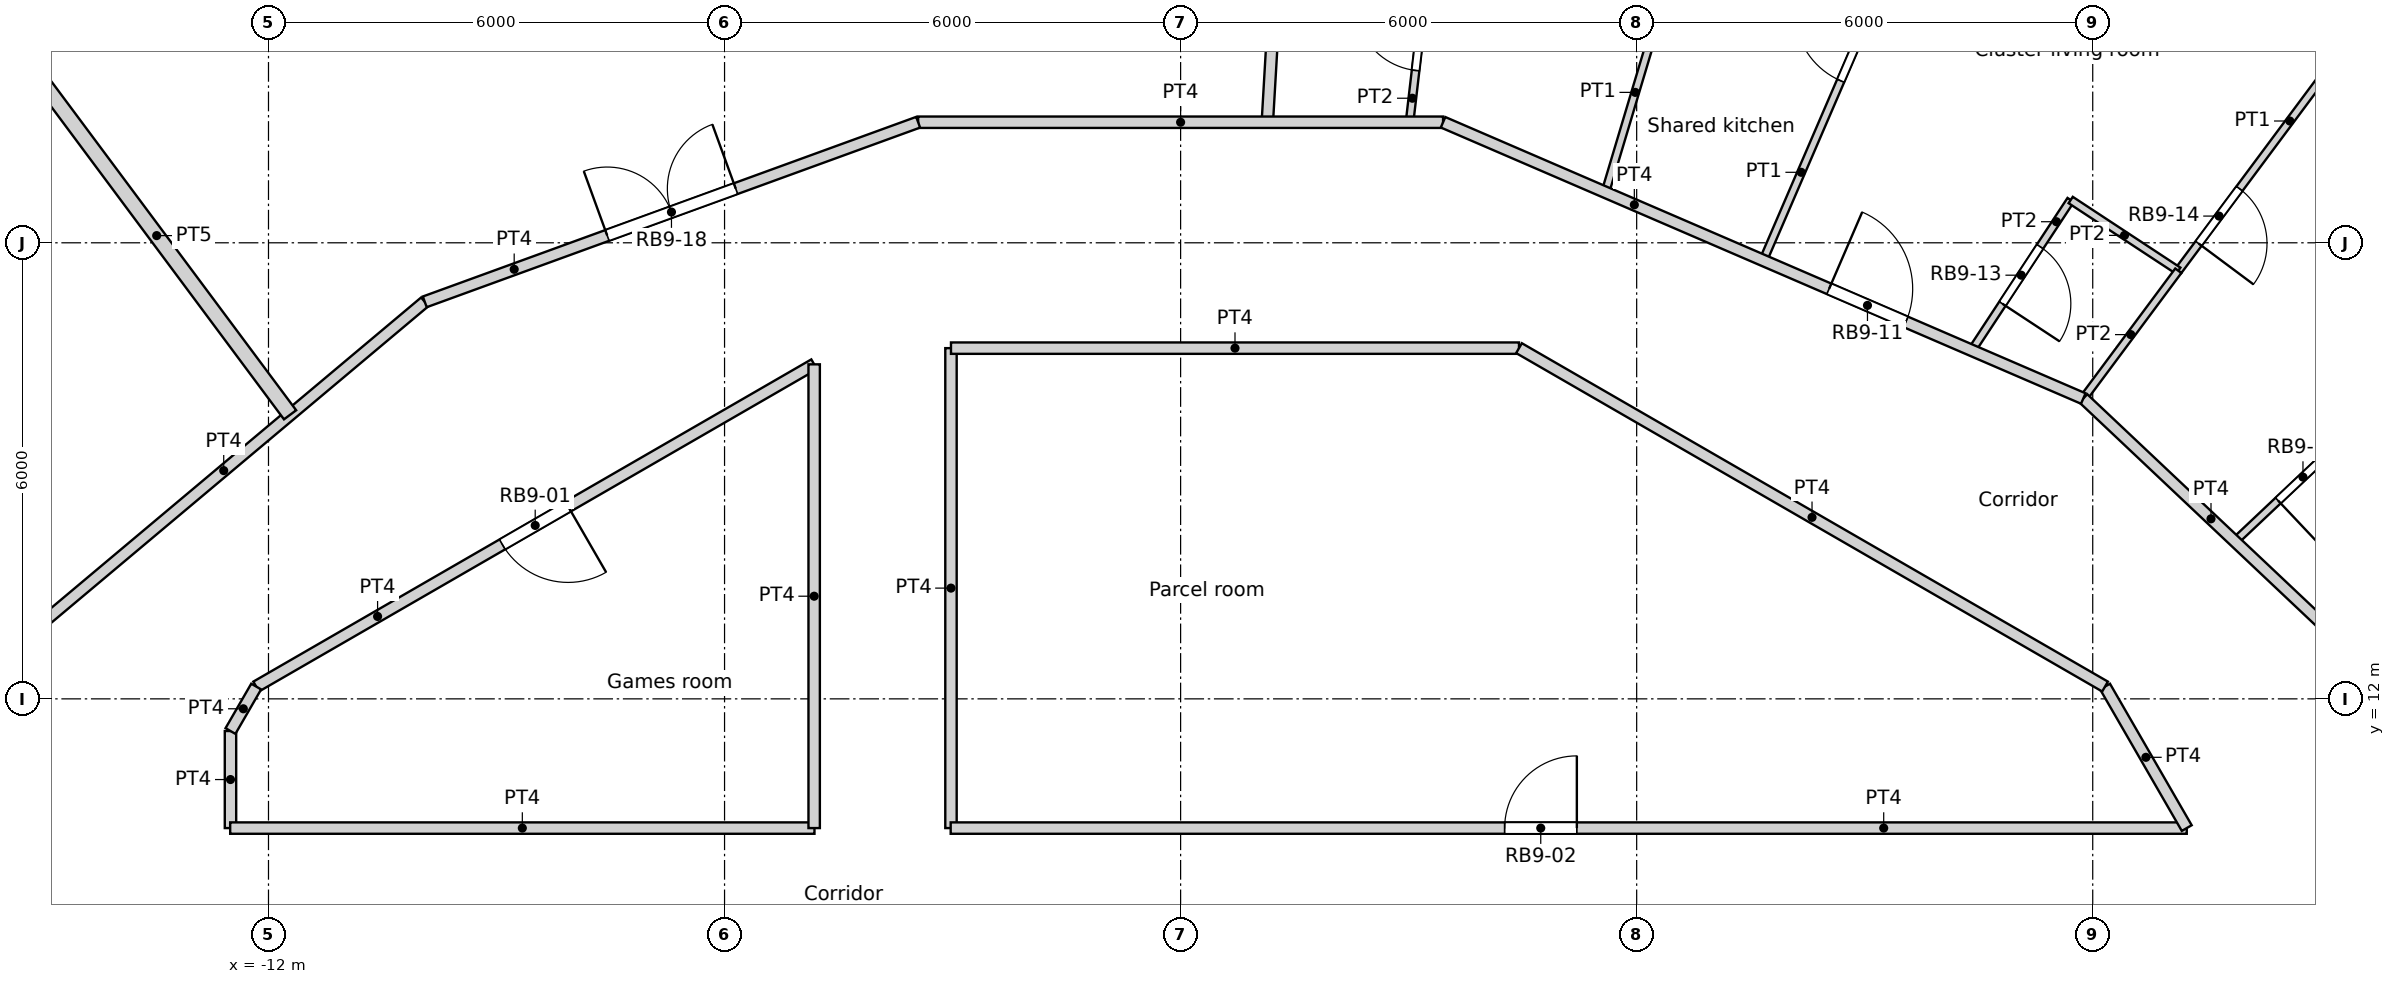
"""IFC4 building model, lengths in metres.
Left out: names, types, materials, properties, quantities, classifications, styles, units other than length and angle.
Written with IfcOpenShell. Run it as: python <this file> out.ifc"""

import sys

from ifc_helpers import new_model, si_unit, direction, frame, frame_2d, origin, origin_2d, place, context, subcontext, project, spatial, rectangle, circle, extrude, element, fill, save


model = new_model("IFC4")
c1 = context("Model", 3, precision=1e-05, world=origin(), true_north=direction((0.0, 1.0)))
c2 = subcontext(c1, "Body", "Model", "MODEL_VIEW")
j1 = project(units=[si_unit("LENGTHUNIT", "METRE"), si_unit("PLANEANGLEUNIT", "RADIAN")], contexts=[c1])
p1 = place(None, origin())
s1 = spatial("IfcSite", under=j1, at=p1, CompositionType="ELEMENT")
p2 = place(p1, origin())
s2 = spatial("IfcBuilding", under=s1, at=p2, CompositionType="ELEMENT")
p3 = place(p2, frame((0.0, 0.0, 212.4)))
s3 = spatial("IfcBuildingStorey", under=s2, at=p3, CompositionType="ELEMENT", Elevation=212.4)
p4 = place(p3, frame((14.659, 19.69, 0.0), z_axis=(0.0, 0.0, 1.0), x_axis=(1.0, 0.0, 0.0)))
e1 = element("IfcColumn", 1, at=p4, inside=s3, PredefinedType="COLUMN", context=c2, shape_type="SweptSolid", body=[
    extrude(circle(Radius=0.6, at=origin_2d()), origin(), (0.0, 0.0, 1.0), 3.6),
])
for number, where, z_axis, x_axis in (
    (2, (15.552, 10.603, 0.0), (0.0, 0.0, 1.0), (1.0, 0.0, 0.0)),
    (3, (11.735, 14.716, 0.0), (0.0, 0.0, 1.0), (1.0, 0.0, 0.0)),
    (4, (6.876, 17.521, 0.0), (0.0, 0.0, 1.0), (1.0, 0.0, 0.0)),
    (5, (1.406, 18.77, 0.0), (0.0, 0.0, 1.0), (1.0, 0.0, 0.0)),
    (6, (-4.188, 18.35, 0.0), (0.0, 0.0, 1.0), (1.0, 0.0, 0.0)),
    (7, (-9.411, 16.301, 0.0), (0.0, 0.0, 1.0), (1.0, 0.0, 0.0)),
    (8, (-13.798, 12.802, 0.0), (0.0, 0.0, 1.0), (1.0, 0.0, 0.0)),
):
    element("IfcColumn", number, at=place(p3, frame(where, z_axis=z_axis, x_axis=x_axis)), inside=s3, PredefinedType="COLUMN", context=c2, shape_type="SweptSolid", body=[
        extrude(circle(Radius=0.65, at=origin_2d()), origin(), (0.0, 0.0, 1.0), 3.6),
    ])
p5 = place(p3, frame((15.308, 20.578, 0.0), z_axis=(0.0, 0.0, 1.0), x_axis=(-0.835470659512, 0.549535055382, 0.0)))
e9 = element("IfcWall", 9, at=p5, inside=s3, PredefinedType="SOLIDWALL", context=c2, shape_type="SweptSolid", body=[
    extrude(rectangle(XDim=2.973, YDim=0.3, at=frame_2d((1.487, 0.0))), origin(), (0.0, 0.0, 1.0), 3.3),
])
p6 = place(p5, frame((1.486, 0.0, 1.55)))
e10 = element("IfcOpeningElement", 10, at=p6, cuts=e9, PredefinedType="OPENING", context=c2, shape_type="SweptSolid", body=[
    extrude(circle(Radius=0.9, at=origin_2d()), frame((0.0, 0.16, 0.0), z_axis=(0.0, -1.0, 0.0), x_axis=(1.0, 0.0, 0.0)), (0.0, 0.0, 1.0), 0.32),
])
p7 = place(p3, frame((-12.824, 22.211, 0.0), z_axis=(0.0, 0.0, 1.0), x_axis=(-0.835470659512, -0.549535055382, 0.0)))
e11 = element("IfcWall", 11, at=p7, inside=s3, PredefinedType="SOLIDWALL", context=c2, shape_type="SweptSolid", body=[
    extrude(rectangle(XDim=2.973, YDim=0.3, at=frame_2d((1.487, 0.0))), origin(), (0.0, 0.0, 1.0), 3.3),
])
p8 = place(p7, frame((1.486, 0.0, 1.55)))
e12 = element("IfcOpeningElement", 12, at=p8, cuts=e11, PredefinedType="OPENING", context=c2, shape_type="SweptSolid", body=[
    extrude(circle(Radius=0.9, at=origin_2d()), frame((0.0, 0.16, 0.0), z_axis=(0.0, -1.0, 0.0), x_axis=(1.0, 0.0, 0.0)), (0.0, 0.0, 1.0), 0.32),
])
p9 = place(p3, frame((-12.504, 10.3, 0.0), z_axis=(0.0, 0.0, 1.0), x_axis=(1.0, 0.0, 0.0)))
e13 = element("IfcWall", 13, at=p9, inside=s3, PredefinedType="PARTITIONING", context=c2, shape_type="SweptSolid", body=[
    extrude(rectangle(XDim=7.687, YDim=0.15, at=frame_2d((3.844, 0.0))), origin(), (0.0, 0.0, 1.0), 3.15),
])
p10 = place(p3, frame((-3.025, 10.3, 0.0), z_axis=(0.0, 0.0, 1.0), x_axis=(1.0, 0.0, 0.0)))
e14 = element("IfcWall", 14, at=p10, inside=s3, PredefinedType="PARTITIONING", context=c2, shape_type="SweptSolid", body=[
    extrude(rectangle(XDim=16.262, YDim=0.15, at=frame_2d((8.131, 0.0))), origin(), (0.0, 0.0, 1.0), 3.15),
])
p11 = place(p10, frame((7.288, 0.0, 0.0)))
e15 = element("IfcOpeningElement", 15, at=p11, cuts=e14, PredefinedType="OPENING", context=c2, shape_type="SweptSolid", body=[
    extrude(rectangle(XDim=0.95, YDim=2.1, at=frame_2d((0.475, 1.05))), frame((0.0, 0.075, 0.0), z_axis=(0.0, -1.0, 0.0), x_axis=(1.0, 0.0, 0.0)), (0.0, 0.0, 1.0), 0.15),
])
p12 = place(p3, frame((12.162, 12.162, 0.0), z_axis=(0.0, 0.0, 1.0), x_axis=(0.499961633463, -0.866047553582, 0.0)))
e16 = element("IfcWall", 16, at=p12, inside=s3, PredefinedType="PARTITIONING", context=c2, shape_type="SweptSolid", body=[
    extrude(rectangle(XDim=2.15, YDim=0.15, at=frame_2d((1.075, 0.0))), origin(), (0.0, 0.0, 1.0), 3.15),
])
p13 = place(p3, frame((11.877, 15.953, 0.0), z_axis=(0.0, 0.0, 1.0), x_axis=(0.727299029876, -0.686320713035, 0.0)))
e17 = element("IfcWall", 17, at=p13, inside=s3, PredefinedType="PARTITIONING", context=c2, shape_type="SweptSolid", body=[
    extrude(rectangle(XDim=4.617, YDim=0.15, at=frame_2d((2.309, 0.0))), origin(), (0.0, 0.0, 1.0), 3.15),
])
p14 = place(p3, frame((-4.821, 10.3, 0.0), z_axis=(0.0, 0.0, 1.0), x_axis=(0.0, 1.0, 0.0)))
e18 = element("IfcWall", 18, at=p14, inside=s3, PredefinedType="PARTITIONING", context=c2, shape_type="SweptSolid", body=[
    extrude(rectangle(XDim=6.101, YDim=0.15, at=frame_2d((3.05, 0.0))), origin(), (0.0, 0.0, 1.0), 3.15),
])
p15 = place(p3, frame((-12.162, 12.162, 0.0), z_axis=(0.0, 0.0, 1.0), x_axis=(0.866004766557, 0.500035743023, 0.0)))
e19 = element("IfcWall", 19, at=p15, inside=s3, PredefinedType="PARTITIONING", context=c2, shape_type="SweptSolid", body=[
    extrude(rectangle(XDim=8.477, YDim=0.15, at=frame_2d((4.239, 0.0))), origin(), (0.0, 0.0, 1.0), 3.15),
])
p16 = place(p15, frame((3.739, 0.0, 0.0)))
e20 = element("IfcOpeningElement", 20, at=p16, cuts=e19, PredefinedType="OPENING", context=c2, shape_type="SweptSolid", body=[
    extrude(rectangle(XDim=1.0, YDim=2.04, at=frame_2d((0.5, 1.02))), frame((0.0, 0.075, 0.0), z_axis=(0.0, -1.0, 0.0), x_axis=(1.0, 0.0, 0.0)), (0.0, 0.0, 1.0), 0.15),
])
p17 = place(p3, frame((4.452, 16.614, 0.0), z_axis=(0.0, 0.0, 1.0), x_axis=(0.866005203721, -0.500034985904, 0.0)))
e21 = element("IfcWall", 21, at=p17, inside=s3, PredefinedType="PARTITIONING", context=c2, shape_type="SweptSolid", body=[
    extrude(rectangle(XDim=8.903, YDim=0.15, at=frame_2d((4.452, 0.0))), origin(), (0.0, 0.0, 1.0), 3.15),
])
p18 = place(p3, frame((-3.021, 16.614, 0.0), z_axis=(0.0, 0.0, 1.0), x_axis=(1.0, 0.0, 0.0)))
e22 = element("IfcWall", 22, at=p18, inside=s3, PredefinedType="PARTITIONING", context=c2, shape_type="SweptSolid", body=[
    extrude(rectangle(XDim=7.473, YDim=0.15, at=frame_2d((3.736, 0.0))), origin(), (0.0, 0.0, 1.0), 3.15),
])
p19 = place(p3, frame((-3.021, 10.3, 0.0), z_axis=(0.0, 0.0, 1.0), x_axis=(0.0, 1.0, 0.0)))
e23 = element("IfcWall", 23, at=p19, inside=s3, PredefinedType="PARTITIONING", context=c2, shape_type="SweptSolid", body=[
    extrude(rectangle(XDim=6.314, YDim=0.15, at=frame_2d((3.157, 0.0))), origin(), (0.0, 0.0, 1.0), 3.15),
])
p20 = place(p3, frame((3.453, 19.586, 0.0), z_axis=(0.0, 0.0, 1.0), x_axis=(0.918175908205, -0.396172944044, 0.0)))
e24 = element("IfcWall", 24, at=p20, inside=s3, PredefinedType="PARTITIONING", context=c2, shape_type="SweptSolid", body=[
    extrude(rectangle(XDim=9.173, YDim=0.15, at=frame_2d((4.587, 0.0))), origin(), (0.0, 0.0, 1.0), 3.15),
])
p21 = place(p20, frame((5.531, 0.0, 0.0)))
e25 = element("IfcOpeningElement", 25, at=p21, cuts=e24, PredefinedType="OPENING", context=c2, shape_type="SweptSolid", body=[
    extrude(rectangle(XDim=1.1, YDim=2.1, at=frame_2d((0.55, 1.05))), frame((0.0, 0.075, 0.0), z_axis=(0.0, -1.0, 0.0), x_axis=(1.0, 0.0, 0.0)), (0.0, 0.0, 1.0), 0.15),
])
p22 = place(p3, frame((-3.453, 19.586, 0.0), z_axis=(0.0, 0.0, 1.0), x_axis=(1.0, 0.0, 0.0)))
e26 = element("IfcWall", 26, at=p22, inside=s3, PredefinedType="PARTITIONING", context=c2, shape_type="SweptSolid", body=[
    extrude(rectangle(XDim=6.906, YDim=0.15, at=frame_2d((3.453, 0.0))), origin(), (0.0, 0.0, 1.0), 3.15),
])
p23 = place(p3, frame((-15.234, 12.783, 0.0), z_axis=(0.0, 0.0, 1.0), x_axis=(0.765936018543, 0.642916802937, 0.0)))
e27 = element("IfcWall", 27, at=p23, inside=s3, PredefinedType="PARTITIONING", context=c2, shape_type="SweptSolid", body=[
    extrude(rectangle(XDim=6.906, YDim=0.15, at=frame_2d((3.453, 0.0))), origin(), (0.0, 0.0, 1.0), 3.15),
])
p24 = place(p3, frame((-9.944, 17.223, 0.0), z_axis=(0.0, 0.0, 1.0), x_axis=(0.939672634566, 0.342075050021, 0.0)))
e28 = element("IfcWall", 28, at=p24, inside=s3, PredefinedType="PARTITIONING", context=c2, shape_type="SweptSolid", body=[
    extrude(rectangle(XDim=6.908, YDim=0.15, at=frame_2d((3.454, 0.0))), origin(), (0.0, 0.0, 1.0), 3.15),
])
p25 = place(p24, frame((2.554, 0.0, 0.0)))
e29 = element("IfcOpeningElement", 29, at=p25, cuts=e28, PredefinedType="OPENING", context=c2, shape_type="SweptSolid", body=[
    extrude(rectangle(XDim=1.8, YDim=2.1, at=frame_2d((0.9, 1.05))), frame((0.0, 0.075, 0.0), z_axis=(0.0, -1.0, 0.0), x_axis=(1.0, 0.0, 0.0)), (0.0, 0.0, 1.0), 0.15),
])
p26 = place(p3, frame((-12.5, 11.577, 0.0), z_axis=(0.0, 0.0, 1.0), x_axis=(0.500024767483, 0.866011103799, 0.0)))
e30 = element("IfcWall", 30, at=p26, inside=s3, PredefinedType="PARTITIONING", context=c2, shape_type="SweptSolid", body=[
    extrude(rectangle(XDim=0.676, YDim=0.15, at=frame_2d((0.338, 0.0))), origin(), (0.0, 0.0, 1.0), 3.15),
])
p27 = place(p3, frame((-12.5, 10.3, 0.0), z_axis=(0.0, 0.0, 1.0), x_axis=(0.0, 1.0, 0.0)))
e31 = element("IfcWall", 31, at=p27, inside=s3, PredefinedType="PARTITIONING", context=c2, shape_type="SweptSolid", body=[
    extrude(rectangle(XDim=1.277, YDim=0.15, at=frame_2d((0.638, 0.0))), origin(), (0.0, 0.0, 1.0), 3.15),
])
p28 = place(p3, frame((7.665, 17.769, 0.0), z_axis=(0.0, 0.0, 1.0), x_axis=(0.396066155507, 0.918221977771, 0.0)))
e32 = element("IfcWall", 32, at=p28, inside=s3, PredefinedType="PARTITIONING", context=c2, shape_type="SweptSolid", body=[
    extrude(rectangle(XDim=6.146, YDim=0.1, at=frame_2d((3.073, 0.0))), origin(), (0.0, 0.0, 1.0), 3.15),
])
p29 = place(p28, frame((2.573, 0.0, 0.0)))
e33 = element("IfcOpeningElement", 33, at=p29, cuts=e32, PredefinedType="OPENING", context=c2, shape_type="SweptSolid", body=[
    extrude(rectangle(XDim=1.0, YDim=2.04, at=frame_2d((0.5, 1.02))), frame((0.0, 0.05, 0.0), z_axis=(0.0, -1.0, 0.0), x_axis=(1.0, 0.0, 0.0)), (0.0, 0.0, 1.0), 0.1),
])
p30 = place(p3, frame((11.71, 18.563, 0.0), z_axis=(0.0, 0.0, 1.0), x_axis=(0.835601560763, -0.549335991584, 0.0)))
e34 = element("IfcWall", 34, at=p30, inside=s3, PredefinedType="PARTITIONING", context=c2, shape_type="SweptSolid", body=[
    extrude(rectangle(XDim=1.695, YDim=0.1, at=frame_2d((0.847, 0.0))), origin(), (0.0, 0.0, 1.0), 3.15),
])
p31 = place(p3, frame((10.409, 16.585, 0.0), z_axis=(0.0, 0.0, 1.0), x_axis=(0.549525589293, 0.835476885804, 0.0)))
e35 = element("IfcWall", 35, at=p31, inside=s3, PredefinedType="PARTITIONING", context=c2, shape_type="SweptSolid", body=[
    extrude(rectangle(XDim=2.367, YDim=0.1, at=frame_2d((1.184, 0.0))), origin(), (0.0, 0.0, 1.0), 3.15),
])
p32 = place(p31, frame((0.733, 0.0, 0.0)))
e36 = element("IfcOpeningElement", 36, at=p32, cuts=e35, PredefinedType="OPENING", context=c2, shape_type="SweptSolid", body=[
    extrude(rectangle(XDim=0.9, YDim=2.0, at=frame_2d((0.45, 1.0))), frame((0.0, 0.05, 0.0), z_axis=(0.0, -1.0, 0.0), x_axis=(1.0, 0.0, 0.0)), (0.0, 0.0, 1.0), 0.1),
])
p33 = place(p3, frame((13.126, 17.632, 0.0), z_axis=(0.0, 0.0, 1.0), x_axis=(0.597307961824, 0.802011969201, 0.0)))
e37 = element("IfcWall", 37, at=p33, inside=s3, PredefinedType="PARTITIONING", context=c2, shape_type="SweptSolid", body=[
    extrude(rectangle(XDim=3.516, YDim=0.1, at=frame_2d((1.758, 0.0))), origin(), (0.0, 0.0, 1.0), 3.15),
])
p34 = place(p33, frame((0.447, 0.0, 0.0)))
e38 = element("IfcOpeningElement", 38, at=p34, cuts=e37, PredefinedType="OPENING", context=c2, shape_type="SweptSolid", body=[
    extrude(rectangle(XDim=0.9, YDim=2.1, at=frame_2d((0.45, 1.05))), frame((0.0, 0.05, 0.0), z_axis=(0.0, -1.0, 0.0), x_axis=(1.0, 0.0, 0.0)), (0.0, 0.0, 1.0), 0.1),
])
p35 = place(p3, frame((5.588, 18.665, 0.0), z_axis=(0.0, 0.0, 1.0), x_axis=(0.286859936776, 0.957972534404, 0.0)))
e39 = element("IfcWall", 39, at=p35, inside=s3, PredefinedType="PARTITIONING", context=c2, shape_type="SweptSolid", body=[
    extrude(rectangle(XDim=6.014, YDim=0.1, at=frame_2d((3.007, 0.0))), origin(), (0.0, 0.0, 1.0), 3.15),
])
p36 = place(p35, frame((2.793, 0.0, 0.0)))
e40 = element("IfcOpeningElement", 40, at=p36, cuts=e39, PredefinedType="OPENING", context=c2, shape_type="SweptSolid", body=[
    extrude(rectangle(XDim=0.9, YDim=2.1, at=frame_2d((0.45, 1.05))), frame((0.0, 0.05, 0.0), z_axis=(0.0, -1.0, 0.0), x_axis=(1.0, 0.0, 0.0)), (0.0, 0.0, 1.0), 0.1),
])
p37 = place(p3, frame((11.876, 15.952, 0.0), z_axis=(0.0, 0.0, 1.0), x_axis=(0.596899091673, 0.802316318144, 0.0)))
e41 = element("IfcWall", 41, at=p37, inside=s3, PredefinedType="PARTITIONING", context=c2, shape_type="SweptSolid", body=[
    extrude(rectangle(XDim=2.094, YDim=0.1, at=frame_2d((1.047, 0.0))), origin(), (0.0, 0.0, 1.0), 3.15),
])
p38 = place(p3, frame((13.87, 14.072, 0.0), z_axis=(0.0, 0.0, 1.0), x_axis=(0.727320856717, 0.686297582237, 0.0)))
e42 = element("IfcWall", 42, at=p38, inside=s3, PredefinedType="PARTITIONING", context=c2, shape_type="SweptSolid", body=[
    extrude(rectangle(XDim=2.464, YDim=0.1, at=frame_2d((1.232, 0.0))), origin(), (0.0, 0.0, 1.0), 3.15),
])
p39 = place(p38, frame((0.782, 0.0, 0.0)))
e43 = element("IfcOpeningElement", 43, at=p39, cuts=e42, PredefinedType="OPENING", context=c2, shape_type="SweptSolid", body=[
    extrude(rectangle(XDim=0.9, YDim=2.04, at=frame_2d((0.45, 1.02))), frame((0.0, 0.05, 0.0), z_axis=(0.0, -1.0, 0.0), x_axis=(1.0, 0.0, 0.0)), (0.0, 0.0, 1.0), 0.1),
])
p40 = place(p3, frame((3.012, 19.586, 0.0), z_axis=(0.0, 0.0, 1.0), x_axis=(0.115762284594, 0.993276947012, 0.0)))
e44 = element("IfcWall", 44, at=p40, inside=s3, PredefinedType="PARTITIONING", context=c2, shape_type="SweptSolid", body=[
    extrude(rectangle(XDim=2.271, YDim=0.1, at=frame_2d((1.136, 0.0))), origin(), (0.0, 0.0, 1.0), 3.15),
])
p41 = place(p40, frame((0.686, 0.0, 0.0)))
e45 = element("IfcOpeningElement", 45, at=p41, cuts=e44, PredefinedType="OPENING", context=c2, shape_type="SweptSolid", body=[
    extrude(rectangle(XDim=0.9, YDim=2.04, at=frame_2d((0.45, 1.02))), frame((0.0, 0.05, 0.0), z_axis=(0.0, -1.0, 0.0), x_axis=(1.0, 0.0, 0.0)), (0.0, 0.0, 1.0), 0.1),
])
p42 = place(p3, frame((1.141, 19.586, 0.0), z_axis=(0.0, 0.0, 1.0), x_axis=(0.058147412668, 0.998308007781, 0.0)))
e46 = element("IfcWall", 46, at=p42, inside=s3, PredefinedType="PARTITIONING", context=c2, shape_type="SweptSolid", body=[
    extrude(rectangle(XDim=5.878, YDim=0.15, at=frame_2d((2.939, 0.0))), origin(), (0.0, 0.0, 1.0), 3.15),
])
p43 = place(p3, frame((-15.226, 20.452, 0.0), z_axis=(0.0, 0.0, 1.0), x_axis=(0.597151875745, -0.802128192557, 0.0)))
e47 = element("IfcWall", 47, at=p43, inside=s3, PredefinedType="PARTITIONING", context=c2, shape_type="SweptSolid", body=[
    extrude(rectangle(XDim=5.878, YDim=0.2, at=frame_2d((2.939, 0.0))), origin(), (0.0, 0.0, 1.0), 3.15),
])
p44 = place(p16, origin())
e48 = element("IfcDoor", 48, at=p44, inside=s3, OperationType="SINGLE_SWING_LEFT", PredefinedType="DOOR", context=c2, shape_type="SweptSolid", body=[
    extrude(rectangle(XDim=1.0, YDim=2.04, at=frame_2d((0.5, 1.02))), frame((0.0, 0.025, 0.0), z_axis=(0.0, -1.0, 0.0), x_axis=(1.0, 0.0, 0.0)), (0.0, 0.0, 1.0), 0.05),
])
fill(e20, e48)
p45 = place(p11, origin())
e49 = element("IfcDoor", 49, at=p45, inside=s3, OperationType="SINGLE_SWING_RIGHT", PredefinedType="DOOR", context=c2, shape_type="SweptSolid", body=[
    extrude(rectangle(XDim=0.95, YDim=2.1, at=frame_2d((0.475, 1.05))), frame((0.0, 0.025, 0.0), z_axis=(0.0, -1.0, 0.0), x_axis=(1.0, 0.0, 0.0)), (0.0, 0.0, 1.0), 0.05),
])
fill(e15, e49)
p46 = place(p21, origin())
e50 = element("IfcDoor", 50, at=p46, inside=s3, OperationType="SINGLE_SWING_LEFT", PredefinedType="DOOR", context=c2, shape_type="SweptSolid", body=[
    extrude(rectangle(XDim=1.1, YDim=2.1, at=frame_2d((0.55, 1.05))), frame((0.0, 0.025, 0.0), z_axis=(0.0, -1.0, 0.0), x_axis=(1.0, 0.0, 0.0)), (0.0, 0.0, 1.0), 0.05),
])
fill(e25, e50)
p47 = place(p29, origin())
e51 = element("IfcDoor", 51, at=p47, inside=s3, OperationType="SINGLE_SWING_RIGHT", PredefinedType="DOOR", context=c2, shape_type="SweptSolid", body=[
    extrude(rectangle(XDim=1.0, YDim=2.04, at=frame_2d((0.5, 1.02))), frame((0.0, 0.025, 0.0), z_axis=(0.0, -1.0, 0.0), x_axis=(1.0, 0.0, 0.0)), (0.0, 0.0, 1.0), 0.05),
])
fill(e33, e51)
p48 = place(p32, origin())
e52 = element("IfcDoor", 52, at=p48, inside=s3, OperationType="SINGLE_SWING_RIGHT", PredefinedType="DOOR", context=c2, shape_type="SweptSolid", body=[
    extrude(rectangle(XDim=0.9, YDim=2.0, at=frame_2d((0.45, 1.0))), frame((0.0, 0.025, 0.0), z_axis=(0.0, -1.0, 0.0), x_axis=(1.0, 0.0, 0.0)), (0.0, 0.0, 1.0), 0.05),
])
fill(e36, e52)
p49 = place(p34, origin())
e53 = element("IfcDoor", 53, at=p49, inside=s3, OperationType="SINGLE_SWING_RIGHT", PredefinedType="DOOR", context=c2, shape_type="SweptSolid", body=[
    extrude(rectangle(XDim=0.9, YDim=2.1, at=frame_2d((0.45, 1.05))), frame((0.0, 0.025, 0.0), z_axis=(0.0, -1.0, 0.0), x_axis=(1.0, 0.0, 0.0)), (0.0, 0.0, 1.0), 0.05),
])
fill(e38, e53)
p50 = place(p39, origin())
e54 = element("IfcDoor", 54, at=p50, inside=s3, OperationType="SINGLE_SWING_RIGHT", PredefinedType="DOOR", context=c2, shape_type="SweptSolid", body=[
    extrude(rectangle(XDim=0.9, YDim=2.04, at=frame_2d((0.45, 1.02))), frame((0.0, 0.025, 0.0), z_axis=(0.0, -1.0, 0.0), x_axis=(1.0, 0.0, 0.0)), (0.0, 0.0, 1.0), 0.05),
])
fill(e43, e54)
p51 = place(p41, origin())
e55 = element("IfcDoor", 55, at=p51, inside=s3, OperationType="SINGLE_SWING_RIGHT", PredefinedType="DOOR", context=c2, shape_type="SweptSolid", body=[
    extrude(rectangle(XDim=0.9, YDim=2.04, at=frame_2d((0.45, 1.02))), frame((0.0, 0.025, 0.0), z_axis=(0.0, -1.0, 0.0), x_axis=(1.0, 0.0, 0.0)), (0.0, 0.0, 1.0), 0.05),
])
fill(e45, e55)
p52 = place(p25, origin())
e56 = element("IfcDoor", 56, at=p52, inside=s3, OperationType="DOUBLE_DOOR_SINGLE_SWING", PredefinedType="DOOR", context=c2, shape_type="SweptSolid", body=[
    extrude(rectangle(XDim=1.8, YDim=2.1, at=frame_2d((0.9, 1.05))), frame((0.0, 0.025, 0.0), z_axis=(0.0, -1.0, 0.0), x_axis=(1.0, 0.0, 0.0)), (0.0, 0.0, 1.0), 0.05),
])
fill(e29, e56)
save(model, sys.argv[1])
